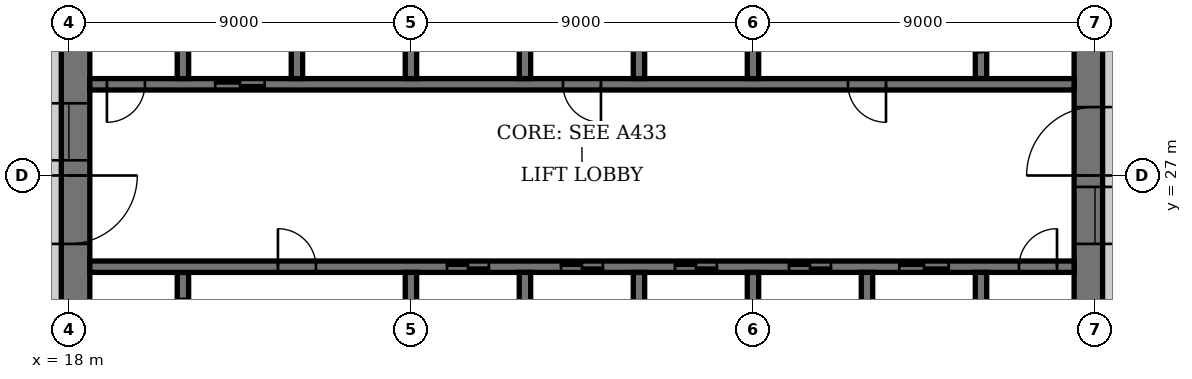
"""IFC4 building model, lengths in metres.
Left out: names, types, materials, properties, quantities, classifications, styles, units other than length and angle.
Written with IfcOpenShell. Run it as: python <this file> out.ifc"""

import sys

from ifc_helpers import new_model, si_unit, direction, frame, frame_2d, origin, place, context, subcontext, project, spatial, polyline, rectangle, outline, extrude, element, fill, save


model = new_model("IFC4")
c1 = context("Model", 3, precision=1e-05, world=origin(), true_north=direction((0.0, 1.0)))
c2 = subcontext(c1, "Body", "Model", "MODEL_VIEW")
j1 = project(units=[si_unit("LENGTHUNIT", "METRE"), si_unit("PLANEANGLEUNIT", "RADIAN")], contexts=[c1])
p1 = place(None, origin())
s1 = spatial("IfcSite", under=j1, at=p1, CompositionType="ELEMENT")
p2 = place(p1, origin())
s2 = spatial("IfcBuilding", under=s1, at=p2, CompositionType="ELEMENT")
p3 = place(p2, frame((0.0, 0.0, 311.8)))
s3 = spatial("IfcBuildingStorey", under=s2, at=p3, CompositionType="ELEMENT", Elevation=311.8)
p4 = place(p3, frame((18.0, 35.45, 0.0), z_axis=(0.0, 0.0, 1.0), x_axis=(0.0, -1.0, 0.0)))
e1 = element("IfcWall", 1, at=p4, inside=s3, PredefinedType="SHEAR", context=c2, shape_type="SweptSolid", body=[
    extrude(rectangle(XDim=16.9, YDim=1.1, at=frame_2d((8.45, 0.0))), origin(), (0.0, 0.0, 1.0), 6.0),
])
p5 = place(p4, frame((8.45, 0.0, 0.0)))
e2 = element("IfcOpeningElement", 2, at=p5, cuts=e1, PredefinedType="OPENING", context=c2, shape_type="SweptSolid", body=[
    extrude(rectangle(XDim=1.8, YDim=2.4, at=frame_2d((0.9, 1.2))), frame((0.0, 0.56, 0.0), z_axis=(0.0, -1.0, 0.0), x_axis=(1.0, 0.0, 0.0)), (0.0, 0.0, 1.0), 1.12),
])
p6 = place(p4, frame((6.55, 0.0, 0.9)))
e3 = element("IfcOpeningElement", 3, at=p6, cuts=e1, PredefinedType="OPENING", context=c2, shape_type="SweptSolid", body=[
    extrude(rectangle(XDim=1.5, YDim=1.8, at=frame_2d((0.75, 0.9))), frame((0.0, 0.56, 0.0), z_axis=(0.0, -1.0, 0.0), x_axis=(1.0, 0.0, 0.0)), (0.0, 0.0, 1.0), 1.12),
])
p7 = place(p3, frame((45.0, 18.55, 0.0), z_axis=(0.0, 0.0, 1.0), x_axis=(0.0, 1.0, 0.0)))
e4 = element("IfcWall", 4, at=p7, inside=s3, PredefinedType="SHEAR", context=c2, shape_type="SweptSolid", body=[
    extrude(rectangle(XDim=16.9, YDim=1.1, at=frame_2d((8.45, 0.0))), origin(), (0.0, 0.0, 1.0), 6.0),
])
p8 = place(p7, frame((8.45, 0.0, 0.0)))
e5 = element("IfcOpeningElement", 5, at=p8, cuts=e4, PredefinedType="OPENING", context=c2, shape_type="SweptSolid", body=[
    extrude(rectangle(XDim=1.8, YDim=2.4, at=frame_2d((0.9, 1.2))), frame((0.0, 0.56, 0.0), z_axis=(0.0, -1.0, 0.0), x_axis=(1.0, 0.0, 0.0)), (0.0, 0.0, 1.0), 1.12),
])
p9 = place(p7, frame((6.65, 0.0, 0.9)))
e6 = element("IfcOpeningElement", 6, at=p9, cuts=e4, PredefinedType="OPENING", context=c2, shape_type="SweptSolid", body=[
    extrude(rectangle(XDim=1.5, YDim=1.8, at=frame_2d((0.75, 0.9))), frame((0.0, 0.56, 0.0), z_axis=(0.0, -1.0, 0.0), x_axis=(1.0, 0.0, 0.0)), (0.0, 0.0, 1.0), 1.12),
])
p10 = place(p3, frame((21.0, 21.95, 0.0), z_axis=(0.0, 0.0, 1.0), x_axis=(0.0, 1.0, 0.0)))
e7 = element("IfcWall", 7, at=p10, inside=s3, PredefinedType="SHEAR", context=c2, shape_type="SweptSolid", body=[
    extrude(rectangle(XDim=2.5, YDim=0.3, at=frame_2d((1.25, 0.0))), origin(), (0.0, 0.0, 1.0), 6.0),
])
p11 = place(p10, frame((0.7, 0.0, 0.0)))
e8 = element("IfcOpeningElement", 8, at=p11, cuts=e7, PredefinedType="OPENING", context=c2, shape_type="SweptSolid", body=[
    extrude(rectangle(XDim=1.1, YDim=2.4, at=frame_2d((0.55, 1.2))), frame((0.0, 0.16, 0.0), z_axis=(0.0, -1.0, 0.0), x_axis=(1.0, 0.0, 0.0)), (0.0, 0.0, 1.0), 0.32),
])
p12 = place(p3, frame((42.0, 29.55, 0.0), z_axis=(0.0, 0.0, 1.0), x_axis=(0.0, 1.0, 0.0)))
e9 = element("IfcWall", 9, at=p12, inside=s3, PredefinedType="SHEAR", context=c2, shape_type="SweptSolid", body=[
    extrude(rectangle(XDim=2.5, YDim=0.3, at=frame_2d((1.25, 0.0))), origin(), (0.0, 0.0, 1.0), 6.0),
])
p13 = place(p12, frame((0.7, 0.0, 0.0)))
e10 = element("IfcOpeningElement", 10, at=p13, cuts=e9, PredefinedType="OPENING", context=c2, shape_type="SweptSolid", body=[
    extrude(rectangle(XDim=1.1, YDim=2.4, at=frame_2d((0.55, 1.2))), frame((0.0, 0.16, 0.0), z_axis=(0.0, -1.0, 0.0), x_axis=(1.0, 0.0, 0.0)), (0.0, 0.0, 1.0), 0.32),
])
p14 = place(p3, frame((18.55, 24.6, 0.0), z_axis=(0.0, 0.0, 1.0), x_axis=(1.0, 0.0, 0.0)))
e11 = element("IfcWall", 11, at=p14, inside=s3, PredefinedType="SHEAR", context=c2, shape_type="SweptSolid", body=[
    extrude(rectangle(XDim=25.9, YDim=0.3, at=frame_2d((12.95, 0.0))), origin(), (0.0, 0.0, 1.0), 6.0),
])
p15 = place(p14, frame((4.95, 0.0, 0.0)))
e12 = element("IfcOpeningElement", 12, at=p15, cuts=e11, PredefinedType="OPENING", context=c2, shape_type="SweptSolid", body=[
    extrude(rectangle(XDim=1.0, YDim=2.4, at=frame_2d((0.5, 1.2))), frame((0.0, 0.16, 0.0), z_axis=(0.0, -1.0, 0.0), x_axis=(1.0, 0.0, 0.0)), (0.0, 0.0, 1.0), 0.32),
])
p16 = place(p14, frame((24.45, 0.0, 0.0)))
e13 = element("IfcOpeningElement", 13, at=p16, cuts=e11, PredefinedType="OPENING", context=c2, shape_type="SweptSolid", body=[
    extrude(rectangle(XDim=1.0, YDim=2.4, at=frame_2d((0.5, 1.2))), frame((0.0, 0.16, 0.0), z_axis=(0.0, -1.0, 0.0), x_axis=(1.0, 0.0, 0.0)), (0.0, 0.0, 1.0), 0.32),
])
p17 = place(p14, frame((9.4, 0.0, 0.0)))
e14 = element("IfcOpeningElement", 14, at=p17, cuts=e11, PredefinedType="OPENING", context=c2, shape_type="SweptSolid", body=[
    extrude(rectangle(XDim=1.1, YDim=2.4, at=frame_2d((0.55, 1.2))), frame((0.0, 0.16, 0.0), z_axis=(0.0, -1.0, 0.0), x_axis=(1.0, 0.0, 0.0)), (0.0, 0.0, 1.0), 0.32),
])
p18 = place(p14, frame((12.4, 0.0, 0.0)))
e15 = element("IfcOpeningElement", 15, at=p18, cuts=e11, PredefinedType="OPENING", context=c2, shape_type="SweptSolid", body=[
    extrude(rectangle(XDim=1.1, YDim=2.4, at=frame_2d((0.55, 1.2))), frame((0.0, 0.16, 0.0), z_axis=(0.0, -1.0, 0.0), x_axis=(1.0, 0.0, 0.0)), (0.0, 0.0, 1.0), 0.32),
])
p19 = place(p14, frame((15.4, 0.0, 0.0)))
e16 = element("IfcOpeningElement", 16, at=p19, cuts=e11, PredefinedType="OPENING", context=c2, shape_type="SweptSolid", body=[
    extrude(rectangle(XDim=1.1, YDim=2.4, at=frame_2d((0.55, 1.2))), frame((0.0, 0.16, 0.0), z_axis=(0.0, -1.0, 0.0), x_axis=(1.0, 0.0, 0.0)), (0.0, 0.0, 1.0), 0.32),
])
p20 = place(p14, frame((18.4, 0.0, 0.0)))
e17 = element("IfcOpeningElement", 17, at=p20, cuts=e11, PredefinedType="OPENING", context=c2, shape_type="SweptSolid", body=[
    extrude(rectangle(XDim=1.1, YDim=2.4, at=frame_2d((0.55, 1.2))), frame((0.0, 0.16, 0.0), z_axis=(0.0, -1.0, 0.0), x_axis=(1.0, 0.0, 0.0)), (0.0, 0.0, 1.0), 0.32),
])
p21 = place(p14, frame((21.3, 0.0, 0.0)))
e18 = element("IfcOpeningElement", 18, at=p21, cuts=e11, PredefinedType="OPENING", context=c2, shape_type="SweptSolid", body=[
    extrude(rectangle(XDim=1.3, YDim=2.4, at=frame_2d((0.65, 1.2))), frame((0.0, 0.16, 0.0), z_axis=(0.0, -1.0, 0.0), x_axis=(1.0, 0.0, 0.0)), (0.0, 0.0, 1.0), 0.32),
])
p22 = place(p3, frame((18.55, 29.4, 0.0), z_axis=(0.0, 0.0, 1.0), x_axis=(1.0, 0.0, 0.0)))
e19 = element("IfcWall", 19, at=p22, inside=s3, PredefinedType="SHEAR", context=c2, shape_type="SweptSolid", body=[
    extrude(rectangle(XDim=25.9, YDim=0.3, at=frame_2d((12.95, 0.0))), origin(), (0.0, 0.0, 1.0), 6.0),
])
p23 = place(p22, frame((19.95, 0.0, 0.0)))
e20 = element("IfcOpeningElement", 20, at=p23, cuts=e19, PredefinedType="OPENING", context=c2, shape_type="SweptSolid", body=[
    extrude(rectangle(XDim=1.0, YDim=2.4, at=frame_2d((0.5, 1.2))), frame((0.0, 0.16, 0.0), z_axis=(0.0, -1.0, 0.0), x_axis=(1.0, 0.0, 0.0)), (0.0, 0.0, 1.0), 0.32),
])
p24 = place(p22, frame((0.45, 0.0, 0.0)))
e21 = element("IfcOpeningElement", 21, at=p24, cuts=e19, PredefinedType="OPENING", context=c2, shape_type="SweptSolid", body=[
    extrude(rectangle(XDim=1.0, YDim=2.4, at=frame_2d((0.5, 1.2))), frame((0.0, 0.16, 0.0), z_axis=(0.0, -1.0, 0.0), x_axis=(1.0, 0.0, 0.0)), (0.0, 0.0, 1.0), 0.32),
])
p25 = place(p22, frame((12.45, 0.0, 0.0)))
e22 = element("IfcOpeningElement", 22, at=p25, cuts=e19, PredefinedType="OPENING", context=c2, shape_type="SweptSolid", body=[
    extrude(rectangle(XDim=1.0, YDim=2.4, at=frame_2d((0.5, 1.2))), frame((0.0, 0.16, 0.0), z_axis=(0.0, -1.0, 0.0), x_axis=(1.0, 0.0, 0.0)), (0.0, 0.0, 1.0), 0.32),
])
p26 = place(p22, frame((3.3, 0.0, 0.0)))
e23 = element("IfcOpeningElement", 23, at=p26, cuts=e19, PredefinedType="OPENING", context=c2, shape_type="SweptSolid", body=[
    extrude(rectangle(XDim=1.3, YDim=2.4, at=frame_2d((0.65, 1.2))), frame((0.0, 0.16, 0.0), z_axis=(0.0, -1.0, 0.0), x_axis=(1.0, 0.0, 0.0)), (0.0, 0.0, 1.0), 0.32),
])
for number, where, z_axis, x_axis in (
    (24, (30.0, 21.75, 0.0), (0.0, 0.0, 1.0), (0.0, 1.0, 0.0)),
    (25, (33.0, 29.55, 0.0), (0.0, 0.0, 1.0), (0.0, 1.0, 0.0)),
    (26, (33.0, 21.75, 0.0), (0.0, 0.0, 1.0), (0.0, 1.0, 0.0)),
    (27, (30.0, 29.55, 0.0), (0.0, 0.0, 1.0), (0.0, 1.0, 0.0)),
    (28, (36.0, 21.75, 0.0), (0.0, 0.0, 1.0), (0.0, 1.0, 0.0)),
    (29, (27.0, 29.55, 0.0), (0.0, 0.0, 1.0), (0.0, 1.0, 0.0)),
):
    element("IfcWall", number, at=place(p3, frame(where, z_axis=z_axis, x_axis=x_axis)), inside=s3, PredefinedType="SHEAR", context=c2, shape_type="SweptSolid", body=[
        extrude(rectangle(XDim=2.7, YDim=0.3, at=frame_2d((1.35, 0.0))), origin(), (0.0, 0.0, 1.0), 6.0),
    ])
p27 = place(p3, frame((39.0, 18.55, 0.0), z_axis=(0.0, 0.0, 1.0), x_axis=(0.0, 1.0, 0.0)))
e30 = element("IfcWall", 30, at=p27, inside=s3, PredefinedType="SHEAR", context=c2, shape_type="SweptSolid", body=[
    extrude(rectangle(XDim=5.9, YDim=0.3, at=frame_2d((2.95, 0.0))), origin(), (0.0, 0.0, 1.0), 6.0),
])
p28 = place(p27, frame((0.95, 0.0, 0.0)))
e31 = element("IfcOpeningElement", 31, at=p28, cuts=e30, PredefinedType="OPENING", context=c2, shape_type="SweptSolid", body=[
    extrude(rectangle(XDim=1.0, YDim=2.4, at=frame_2d((0.5, 1.2))), frame((0.0, 0.16, 0.0), z_axis=(0.0, -1.0, 0.0), x_axis=(1.0, 0.0, 0.0)), (0.0, 0.0, 1.0), 0.32),
])
p29 = place(p3, frame((24.0, 29.55, 0.0), z_axis=(0.0, 0.0, 1.0), x_axis=(0.0, 1.0, 0.0)))
e32 = element("IfcWall", 32, at=p29, inside=s3, PredefinedType="SHEAR", context=c2, shape_type="SweptSolid", body=[
    extrude(rectangle(XDim=5.9, YDim=0.3, at=frame_2d((2.95, 0.0))), origin(), (0.0, 0.0, 1.0), 6.0),
])
p30 = place(p29, frame((3.95, 0.0, 0.0)))
e33 = element("IfcOpeningElement", 33, at=p30, cuts=e32, PredefinedType="OPENING", context=c2, shape_type="SweptSolid", body=[
    extrude(rectangle(XDim=1.0, YDim=2.4, at=frame_2d((0.5, 1.2))), frame((0.0, 0.16, 0.0), z_axis=(0.0, -1.0, 0.0), x_axis=(1.0, 0.0, 0.0)), (0.0, 0.0, 1.0), 0.32),
])
for number, where, z_axis, x_axis in (
    (34, (42.0, 21.75, 0.0), (0.0, 0.0, 1.0), (0.0, 1.0, 0.0)),
    (35, (21.0, 29.55, 0.0), (0.0, 0.0, 1.0), (0.0, 1.0, 0.0)),
):
    element("IfcWall", number, at=place(p3, frame(where, z_axis=z_axis, x_axis=x_axis)), inside=s3, PredefinedType="SHEAR", context=c2, shape_type="SweptSolid", body=[
        extrude(rectangle(XDim=2.7, YDim=0.3, at=frame_2d((1.35, 0.0))), origin(), (0.0, 0.0, 1.0), 6.0),
    ])
for number, where, z_axis, x_axis in (
    (36, (27.0, 21.6, 0.0), (0.0, 0.0, 1.0), (0.0, 1.0, 0.0)),
    (37, (36.0, 29.55, 0.0), (0.0, 0.0, 1.0), (0.0, 1.0, 0.0)),
):
    element("IfcWall", number, at=place(p3, frame(where, z_axis=z_axis, x_axis=x_axis)), inside=s3, PredefinedType="SHEAR", context=c2, shape_type="SweptSolid", body=[
        extrude(rectangle(XDim=2.85, YDim=0.3, at=frame_2d((1.425, 0.0))), origin(), (0.0, 0.0, 1.0), 6.0),
    ])
p31 = place(p3, frame((0.0, 0.0, 5.6)))
e38 = element("IfcWall", 38, at=p31, inside=s3, PredefinedType="PARAPET", context=c2, shape_type="SweptSolid", body=[
    extrude(outline(polyline([(45.0, 0.0), (46.175, 0.077), (47.329, 0.307), (48.444, 0.685), (49.5, 1.206), (50.479, 1.86), (51.364, 2.636), (52.14, 3.521), (52.794, 4.5), (53.315, 5.556), (53.693, 6.671), (53.923, 7.825), (54.0, 9.0), (54.0, 36.0), (53.923, 37.175), (53.693, 38.329), (53.315, 39.444), (52.794, 40.5), (52.14, 41.479), (51.364, 42.364), (50.479, 43.14), (49.5, 43.794), (48.444, 44.315), (47.329, 44.693), (46.175, 44.923), (45.0, 45.0), (18.0, 45.0), (16.825, 44.923), (15.671, 44.693), (14.556, 44.315), (13.5, 43.794), (12.521, 43.14), (11.636, 42.364), (10.86, 41.479), (10.206, 40.5), (9.685, 39.444), (9.307, 38.329), (9.077, 37.175), (9.0, 36.0), (9.0, 9.0), (9.077, 7.825), (9.307, 6.671), (9.685, 5.556), (10.206, 4.5), (10.86, 3.521), (11.636, 2.636), (12.521, 1.86), (13.5, 1.206), (14.556, 0.685), (15.671, 0.307), (16.825, 0.077), (18.0, 0.0), (45.0, 0.0)]), holes=[polyline([(44.989, 0.35), (18.011, 0.35), (16.871, 0.425), (15.761, 0.646), (14.69, 1.009), (13.675, 1.51), (12.735, 2.138), (11.884, 2.884), (11.138, 3.735), (10.51, 4.675), (10.009, 5.69), (9.646, 6.761), (9.425, 7.871), (9.35, 9.011), (9.35, 35.989), (9.425, 37.129), (9.646, 38.239), (10.009, 39.31), (10.51, 40.325), (11.138, 41.265), (11.884, 42.116), (12.735, 42.862), (13.675, 43.49), (14.69, 43.991), (15.761, 44.354), (16.871, 44.575), (18.011, 44.65), (44.989, 44.65), (46.129, 44.575), (47.239, 44.354), (48.31, 43.991), (49.325, 43.49), (50.265, 42.862), (51.116, 42.116), (51.862, 41.265), (52.49, 40.325), (52.991, 39.31), (53.354, 38.239), (53.575, 37.129), (53.65, 35.989), (53.65, 9.011), (53.575, 7.871), (53.354, 6.761), (52.991, 5.69), (52.49, 4.675), (51.862, 3.735), (51.116, 2.884), (50.265, 2.138), (49.325, 1.51), (48.31, 1.009), (47.239, 0.646), (46.129, 0.425), (44.989, 0.35)])]), origin(), (0.0, 0.0, 1.0), 0.6),
])
p32 = place(p5, origin())
e39 = element("IfcDoor", 39, at=p32, inside=s3, OperationType="DOUBLE_DOOR_DOUBLE_SWING", PredefinedType="DOOR", context=c2, shape_type="SweptSolid", body=[
    extrude(rectangle(XDim=1.8, YDim=2.4, at=frame_2d((0.9, 1.2))), frame((0.0, 0.03, 0.0), z_axis=(0.0, -1.0, 0.0), x_axis=(1.0, 0.0, 0.0)), (0.0, 0.0, 1.0), 0.06),
    extrude(rectangle(XDim=0.04, YDim=2.4, at=frame_2d((0.02, 1.2))), frame((0.0, 0.55, 0.0), z_axis=(0.0, -1.0, 0.0), x_axis=(1.0, 0.0, 0.0)), (0.0, 0.0, 1.0), 1.1),
    extrude(rectangle(XDim=0.04, YDim=2.4, at=frame_2d((1.78, 1.2))), frame((0.0, 0.55, 0.0), z_axis=(0.0, -1.0, 0.0), x_axis=(1.0, 0.0, 0.0)), (0.0, 0.0, 1.0), 1.1),
    extrude(rectangle(XDim=1.8, YDim=0.04, at=frame_2d((0.9, 2.38))), frame((0.0, 0.55, 0.0), z_axis=(0.0, -1.0, 0.0), x_axis=(1.0, 0.0, 0.0)), (0.0, 0.0, 1.0), 1.1),
])
fill(e2, e39)
p33 = place(p8, origin())
e40 = element("IfcDoor", 40, at=p33, inside=s3, OperationType="DOUBLE_DOOR_DOUBLE_SWING", PredefinedType="DOOR", context=c2, shape_type="SweptSolid", body=[
    extrude(rectangle(XDim=1.8, YDim=2.4, at=frame_2d((0.9, 1.2))), frame((0.0, 0.03, 0.0), z_axis=(0.0, -1.0, 0.0), x_axis=(1.0, 0.0, 0.0)), (0.0, 0.0, 1.0), 0.06),
    extrude(rectangle(XDim=0.04, YDim=2.4, at=frame_2d((0.02, 1.2))), frame((0.0, 0.55, 0.0), z_axis=(0.0, -1.0, 0.0), x_axis=(1.0, 0.0, 0.0)), (0.0, 0.0, 1.0), 1.1),
    extrude(rectangle(XDim=0.04, YDim=2.4, at=frame_2d((1.78, 1.2))), frame((0.0, 0.55, 0.0), z_axis=(0.0, -1.0, 0.0), x_axis=(1.0, 0.0, 0.0)), (0.0, 0.0, 1.0), 1.1),
    extrude(rectangle(XDim=1.8, YDim=0.04, at=frame_2d((0.9, 2.38))), frame((0.0, 0.55, 0.0), z_axis=(0.0, -1.0, 0.0), x_axis=(1.0, 0.0, 0.0)), (0.0, 0.0, 1.0), 1.1),
])
fill(e5, e40)
p34 = place(p15, origin())
e41 = element("IfcDoor", 41, at=p34, inside=s3, OperationType="SINGLE_SWING_RIGHT", PredefinedType="DOOR", context=c2, shape_type="SweptSolid", body=[
    extrude(rectangle(XDim=1.0, YDim=2.4, at=frame_2d((0.5, 1.2))), frame((0.0, 0.03, 0.0), z_axis=(0.0, -1.0, 0.0), x_axis=(1.0, 0.0, 0.0)), (0.0, 0.0, 1.0), 0.06),
])
fill(e12, e41)
p35 = place(p23, origin())
e42 = element("IfcDoor", 42, at=p35, inside=s3, OperationType="SINGLE_SWING_RIGHT", PredefinedType="DOOR", context=c2, shape_type="SweptSolid", body=[
    extrude(rectangle(XDim=1.0, YDim=2.4, at=frame_2d((0.5, 1.2))), frame((0.0, 0.03, 0.0), z_axis=(0.0, -1.0, 0.0), x_axis=(1.0, 0.0, 0.0)), (0.0, 0.0, 1.0), 0.06),
])
fill(e20, e42)
p36 = place(p16, origin())
e43 = element("IfcDoor", 43, at=p36, inside=s3, OperationType="SINGLE_SWING_LEFT", PredefinedType="DOOR", context=c2, shape_type="SweptSolid", body=[
    extrude(rectangle(XDim=1.0, YDim=2.4, at=frame_2d((0.5, 1.2))), frame((0.0, 0.03, 0.0), z_axis=(0.0, -1.0, 0.0), x_axis=(1.0, 0.0, 0.0)), (0.0, 0.0, 1.0), 0.06),
])
fill(e13, e43)
p37 = place(p24, origin())
e44 = element("IfcDoor", 44, at=p37, inside=s3, OperationType="SINGLE_SWING_LEFT", PredefinedType="DOOR", context=c2, shape_type="SweptSolid", body=[
    extrude(rectangle(XDim=1.0, YDim=2.4, at=frame_2d((0.5, 1.2))), frame((0.0, 0.03, 0.0), z_axis=(0.0, -1.0, 0.0), x_axis=(1.0, 0.0, 0.0)), (0.0, 0.0, 1.0), 0.06),
])
fill(e21, e44)
p38 = place(p25, origin())
e45 = element("IfcDoor", 45, at=p38, inside=s3, OperationType="SINGLE_SWING_RIGHT", PredefinedType="DOOR", context=c2, shape_type="SweptSolid", body=[
    extrude(rectangle(XDim=1.0, YDim=2.4, at=frame_2d((0.5, 1.2))), frame((0.0, 0.03, 0.0), z_axis=(0.0, -1.0, 0.0), x_axis=(1.0, 0.0, 0.0)), (0.0, 0.0, 1.0), 0.06),
])
fill(e22, e45)
p39 = place(p17, origin())
e46 = element("IfcDoor", 46, at=p39, inside=s3, OperationType="DOUBLE_DOOR_SLIDING", PredefinedType="DOOR", context=c2, shape_type="SweptSolid", body=[
    extrude(rectangle(XDim=1.1, YDim=2.4, at=frame_2d((0.55, 1.2))), frame((0.0, 0.02, 0.0), z_axis=(0.0, -1.0, 0.0), x_axis=(1.0, 0.0, 0.0)), (0.0, 0.0, 1.0), 0.04),
])
fill(e14, e46)
p40 = place(p18, origin())
e47 = element("IfcDoor", 47, at=p40, inside=s3, OperationType="DOUBLE_DOOR_SLIDING", PredefinedType="DOOR", context=c2, shape_type="SweptSolid", body=[
    extrude(rectangle(XDim=1.1, YDim=2.4, at=frame_2d((0.55, 1.2))), frame((0.0, 0.02, 0.0), z_axis=(0.0, -1.0, 0.0), x_axis=(1.0, 0.0, 0.0)), (0.0, 0.0, 1.0), 0.04),
])
fill(e15, e47)
p41 = place(p19, origin())
e48 = element("IfcDoor", 48, at=p41, inside=s3, OperationType="DOUBLE_DOOR_SLIDING", PredefinedType="DOOR", context=c2, shape_type="SweptSolid", body=[
    extrude(rectangle(XDim=1.1, YDim=2.4, at=frame_2d((0.55, 1.2))), frame((0.0, 0.02, 0.0), z_axis=(0.0, -1.0, 0.0), x_axis=(1.0, 0.0, 0.0)), (0.0, 0.0, 1.0), 0.04),
])
fill(e16, e48)
p42 = place(p20, origin())
e49 = element("IfcDoor", 49, at=p42, inside=s3, OperationType="DOUBLE_DOOR_SLIDING", PredefinedType="DOOR", context=c2, shape_type="SweptSolid", body=[
    extrude(rectangle(XDim=1.1, YDim=2.4, at=frame_2d((0.55, 1.2))), frame((0.0, 0.02, 0.0), z_axis=(0.0, -1.0, 0.0), x_axis=(1.0, 0.0, 0.0)), (0.0, 0.0, 1.0), 0.04),
])
fill(e17, e49)
p43 = place(p21, origin())
e50 = element("IfcDoor", 50, at=p43, inside=s3, OperationType="DOUBLE_DOOR_SLIDING", PredefinedType="DOOR", context=c2, shape_type="SweptSolid", body=[
    extrude(rectangle(XDim=1.3, YDim=2.4, at=frame_2d((0.65, 1.2))), frame((0.0, 0.02, 0.0), z_axis=(0.0, -1.0, 0.0), x_axis=(1.0, 0.0, 0.0)), (0.0, 0.0, 1.0), 0.04),
])
fill(e18, e50)
p44 = place(p26, origin())
e51 = element("IfcDoor", 51, at=p44, inside=s3, OperationType="DOUBLE_DOOR_SLIDING", PredefinedType="DOOR", context=c2, shape_type="SweptSolid", body=[
    extrude(rectangle(XDim=1.3, YDim=2.4, at=frame_2d((0.65, 1.2))), frame((0.0, 0.02, 0.0), z_axis=(0.0, -1.0, 0.0), x_axis=(1.0, 0.0, 0.0)), (0.0, 0.0, 1.0), 0.04),
])
fill(e23, e51)
p45 = place(p6, origin())
e52 = element("IfcWindow", 52, at=p45, inside=s3, PartitioningType="SINGLE_PANEL", PredefinedType="WINDOW", context=c2, shape_type="SweptSolid", body=[
    extrude(rectangle(XDim=1.5, YDim=1.8, at=frame_2d((0.75, 0.9))), frame((0.0, 0.03, 0.0), z_axis=(0.0, -1.0, 0.0), x_axis=(1.0, 0.0, 0.0)), (0.0, 0.0, 1.0), 0.06),
])
fill(e3, e52)
p46 = place(p9, origin())
e53 = element("IfcWindow", 53, at=p46, inside=s3, PartitioningType="SINGLE_PANEL", PredefinedType="WINDOW", context=c2, shape_type="SweptSolid", body=[
    extrude(rectangle(XDim=1.5, YDim=1.8, at=frame_2d((0.75, 0.9))), frame((0.0, 0.03, 0.0), z_axis=(0.0, -1.0, 0.0), x_axis=(1.0, 0.0, 0.0)), (0.0, 0.0, 1.0), 0.06),
])
fill(e6, e53)
save(model, sys.argv[1])
